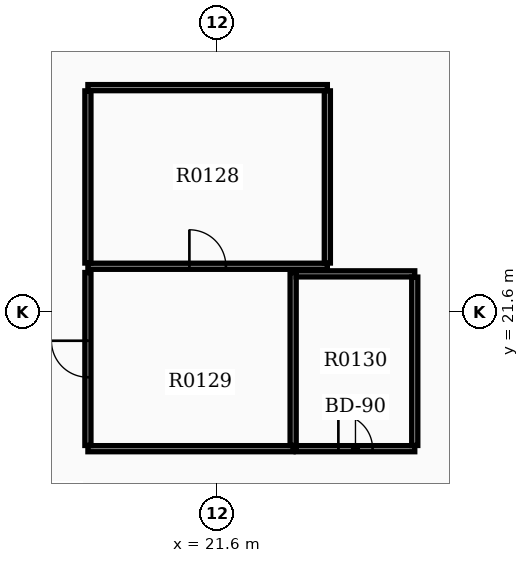
"""IFC4 building model, lengths in metres.
Left out: names, types, materials, properties, quantities, classifications, styles, units other than length and angle.
Written with IfcOpenShell. Run it as: python <this file> out.ifc"""

import sys

from ifc_helpers import new_model, si_unit, direction, frame, frame_2d, origin, place, context, subcontext, project, spatial, rectangle, extrude, element, fill, save


model = new_model("IFC4")
c1 = context("Model", 3, precision=1e-05, world=origin(), true_north=direction((0.0, 1.0)))
c2 = subcontext(c1, "Body", "Model", "MODEL_VIEW")
j1 = project(units=[si_unit("LENGTHUNIT", "METRE"), si_unit("PLANEANGLEUNIT", "RADIAN")], contexts=[c1])
p1 = place(None, origin())
s1 = spatial("IfcSite", under=j1, at=p1, CompositionType="ELEMENT")
p2 = place(p1, origin())
s2 = spatial("IfcBuilding", under=s1, at=p2, CompositionType="ELEMENT")
p3 = place(p2, origin())
s3 = spatial("IfcBuildingStorey", under=s2, at=p3, CompositionType="ELEMENT", Elevation=0.0)
p4 = place(p3, frame((18.2, 22.8, 0.0), z_axis=(0.0, 0.0, 1.0), x_axis=(1.0, 0.0, 0.0)))
e1 = element("IfcWall", 1, at=p4, inside=s3, PredefinedType="PARTITIONING", context=c2, shape_type="SweptSolid", body=[
    extrude(rectangle(XDim=6.3, YDim=0.16, at=frame_2d((3.15, 0.0))), origin(), (0.0, 0.0, 1.0), 2.67),
])
p5 = place(p4, frame((2.67, 0.0, 0.0)))
e2 = element("IfcOpeningElement", 2, at=p5, cuts=e1, PredefinedType="OPENING", context=c2, shape_type="SweptSolid", body=[
    extrude(rectangle(XDim=0.96, YDim=2.15, at=frame_2d((0.48, 1.075))), frame((0.0, 0.09, 0.0), z_axis=(0.0, -1.0, 0.0), x_axis=(1.0, 0.0, 0.0)), (0.0, 0.0, 1.0), 0.18),
])
p6 = place(p3, frame((18.2, 27.5, 0.0), z_axis=(0.0, 0.0, 1.0), x_axis=(1.0, 0.0, 0.0)))
e3 = element("IfcWall", 3, at=p6, inside=s3, PredefinedType="PARTITIONING", context=c2, shape_type="SweptSolid", body=[
    extrude(rectangle(XDim=6.3, YDim=0.16, at=frame_2d((3.15, 0.0))), origin(), (0.0, 0.0, 1.0), 2.67),
])
for number, where, z_axis, x_axis in (
    (4, (18.2, 22.885, 0.0), (0.0, 0.0, 1.0), (0.0, 1.0, 0.0)),
    (5, (24.5, 22.885, 0.0), (0.0, 0.0, 1.0), (0.0, 1.0, 0.0)),
):
    element("IfcWall", number, at=place(p3, frame(where, z_axis=z_axis, x_axis=x_axis)), inside=s3, PredefinedType="PARTITIONING", context=c2, shape_type="SweptSolid", body=[
        extrude(rectangle(XDim=4.53, YDim=0.16, at=frame_2d((2.265, 0.0))), origin(), (0.0, 0.0, 1.0), 2.67),
    ])
p7 = place(p3, frame((18.2, 18.0, 0.0), z_axis=(0.0, 0.0, 1.0), x_axis=(1.0, 0.0, 0.0)))
e6 = element("IfcWall", 6, at=p7, inside=s3, PredefinedType="PARTITIONING", context=c2, shape_type="SweptSolid", body=[
    extrude(rectangle(XDim=5.4, YDim=0.16, at=frame_2d((2.7, 0.0))), origin(), (0.0, 0.0, 1.0), 2.67),
])
p8 = place(p3, frame((18.2, 18.085, 0.0), z_axis=(0.0, 0.0, 1.0), x_axis=(0.0, 1.0, 0.0)))
e7 = element("IfcWall", 7, at=p8, inside=s3, PredefinedType="PARTITIONING", context=c2, shape_type="SweptSolid", body=[
    extrude(rectangle(XDim=4.55, YDim=0.16, at=frame_2d((2.275, 0.0))), origin(), (0.0, 0.0, 1.0), 2.67),
])
p9 = place(p8, frame((1.795, 0.0, 0.0)))
e8 = element("IfcOpeningElement", 8, at=p9, cuts=e7, PredefinedType="OPENING", context=c2, shape_type="SweptSolid", body=[
    extrude(rectangle(XDim=0.96, YDim=2.15, at=frame_2d((0.48, 1.075))), frame((0.0, 0.09, 0.0), z_axis=(0.0, -1.0, 0.0), x_axis=(1.0, 0.0, 0.0)), (0.0, 0.0, 1.0), 0.18),
])
p10 = place(p3, frame((23.6, 18.085, 0.0), z_axis=(0.0, 0.0, 1.0), x_axis=(0.0, 1.0, 0.0)))
e9 = element("IfcWall", 9, at=p10, inside=s3, PredefinedType="PARTITIONING", context=c2, shape_type="SweptSolid", body=[
    extrude(rectangle(XDim=4.55, YDim=0.16, at=frame_2d((2.275, 0.0))), origin(), (0.0, 0.0, 1.0), 2.67),
])
p11 = place(p3, frame((23.68, 18.0, 0.0), z_axis=(0.0, 0.0, 1.0), x_axis=(1.0, 0.0, 0.0)))
e10 = element("IfcWall", 10, at=p11, inside=s3, PredefinedType="PARTITIONING", context=c2, shape_type="SweptSolid", body=[
    extrude(rectangle(XDim=3.12, YDim=0.16, at=frame_2d((1.56, 0.0))), origin(), (0.0, 0.0, 1.0), 2.67),
])
p12 = place(p11, frame((1.11, 0.0, 0.0)))
e11 = element("IfcOpeningElement", 11, at=p12, cuts=e10, PredefinedType="OPENING", context=c2, shape_type="SweptSolid", body=[
    extrude(rectangle(XDim=0.9, YDim=2.15, at=frame_2d((0.45, 1.075))), frame((0.0, 0.09, 0.0), z_axis=(0.0, -1.0, 0.0), x_axis=(1.0, 0.0, 0.0)), (0.0, 0.0, 1.0), 0.18),
])
p13 = place(p3, frame((23.68, 22.6, 0.0), z_axis=(0.0, 0.0, 1.0), x_axis=(1.0, 0.0, 0.0)))
e12 = element("IfcWall", 12, at=p13, inside=s3, PredefinedType="PARTITIONING", context=c2, shape_type="SweptSolid", body=[
    extrude(rectangle(XDim=3.12, YDim=0.16, at=frame_2d((1.56, 0.0))), origin(), (0.0, 0.0, 1.0), 2.67),
])
p14 = place(p3, frame((26.8, 18.085, 0.0), z_axis=(0.0, 0.0, 1.0), x_axis=(0.0, 1.0, 0.0)))
e13 = element("IfcWall", 13, at=p14, inside=s3, PredefinedType="PARTITIONING", context=c2, shape_type="SweptSolid", body=[
    extrude(rectangle(XDim=4.43, YDim=0.16, at=frame_2d((2.215, 0.0))), origin(), (0.0, 0.0, 1.0), 2.67),
])
p15 = place(p5, origin())
e14 = element("IfcDoor", 14, at=p15, inside=s3, OperationType="SINGLE_SWING_LEFT", PredefinedType="DOOR", context=c2, shape_type="SweptSolid", body=[
    extrude(rectangle(XDim=0.96, YDim=2.15, at=frame_2d((0.48, 1.075))), frame((0.0, 0.025, 0.0), z_axis=(0.0, -1.0, 0.0), x_axis=(1.0, 0.0, 0.0)), (0.0, 0.0, 1.0), 0.05),
])
fill(e2, e14)
p16 = place(p9, origin())
e15 = element("IfcDoor", 15, at=p16, inside=s3, OperationType="SINGLE_SWING_RIGHT", PredefinedType="DOOR", context=c2, shape_type="SweptSolid", body=[
    extrude(rectangle(XDim=0.96, YDim=2.15, at=frame_2d((0.48, 1.075))), frame((0.0, 0.025, 0.0), z_axis=(0.0, -1.0, 0.0), x_axis=(1.0, 0.0, 0.0)), (0.0, 0.0, 1.0), 0.05),
])
fill(e8, e15)
p17 = place(p12, origin())
e16 = element("IfcDoor", 16, at=p17, inside=s3, OperationType="SINGLE_SWING_LEFT", PredefinedType="DOOR", context=c2, shape_type="SweptSolid", body=[
    extrude(rectangle(XDim=0.9, YDim=2.15, at=frame_2d((0.45, 1.075))), frame((0.0, 0.025, 0.0), z_axis=(0.0, -1.0, 0.0), x_axis=(1.0, 0.0, 0.0)), (0.0, 0.0, 1.0), 0.05),
])
fill(e11, e16)
save(model, sys.argv[1])
